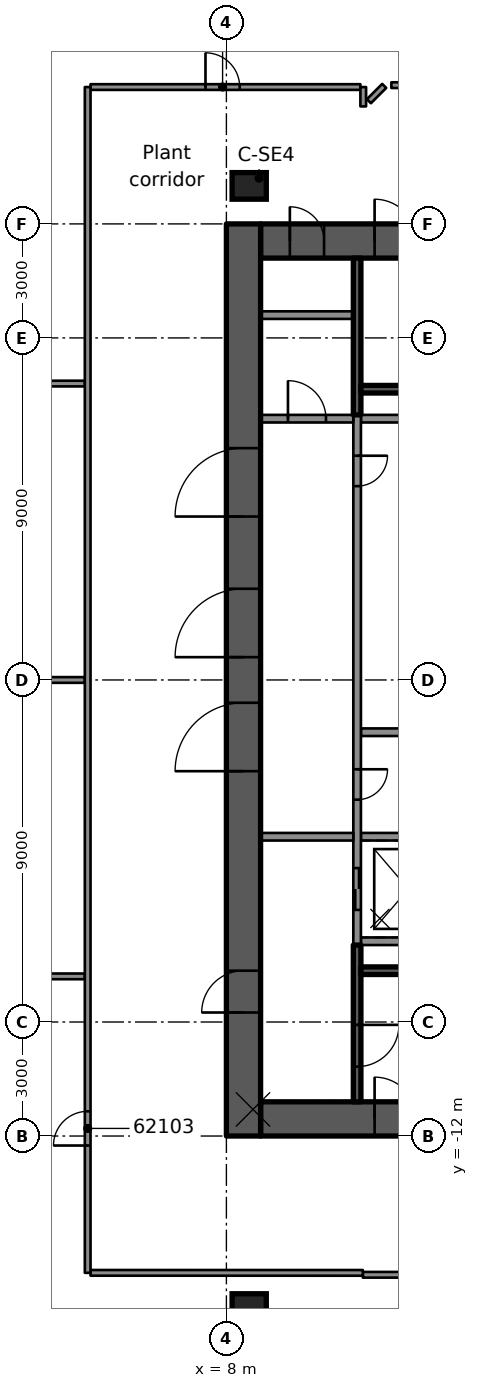
"""IFC4 building model, lengths in metres.
Left out: names, types, materials, properties, quantities, classifications, styles, units other than length and angle.
Written with IfcOpenShell. Run it as: python <this file> out.ifc"""

import sys

from ifc_helpers import new_model, si_unit, direction, frame, frame_2d, origin, origin_2d, place, context, subcontext, project, spatial, rectangle, extrude, element, fill, save


model = new_model("IFC4")
c1 = context("Model", 3, precision=1e-05, world=origin(), true_north=direction((0.0, 1.0)))
c2 = subcontext(c1, "Body", "Model", "MODEL_VIEW")
j1 = project(units=[si_unit("LENGTHUNIT", "METRE"), si_unit("PLANEANGLEUNIT", "RADIAN")], contexts=[c1])
p1 = place(None, origin())
s1 = spatial("IfcSite", under=j1, at=p1, CompositionType="ELEMENT")
p2 = place(p1, origin())
s2 = spatial("IfcBuilding", under=s1, at=p2, CompositionType="ELEMENT")
p3 = place(p2, frame((0.0, 0.0, 299.9)))
s3 = spatial("IfcBuildingStorey", under=s2, at=p3, CompositionType="ELEMENT", Elevation=299.9)
p4 = place(p3, frame((8.9, 11.55, 0.0), z_axis=(0.0, 0.0, 1.0), x_axis=(1.0, 0.0, 0.0)))
e1 = element("IfcWall", 1, at=p4, inside=s3, PredefinedType="SHEAR", context=c2, shape_type="SweptSolid", body=[
    extrude(rectangle(XDim=9.2, YDim=0.9, at=frame_2d((4.6, 0.0))), origin(), (0.0, 0.0, 1.0), 4.4),
])
p5 = place(p4, frame((3.0, 0.0, 0.0)))
e2 = element("IfcOpeningElement", 2, at=p5, cuts=e1, PredefinedType="OPENING", context=c2, shape_type="SweptSolid", body=[
    extrude(rectangle(XDim=1.1, YDim=2.1, at=frame_2d((0.55, 1.05))), frame((0.0, 0.46, 0.0), z_axis=(0.0, -1.0, 0.0), x_axis=(1.0, 0.0, 0.0)), (0.0, 0.0, 1.0), 0.92),
])
p6 = place(p4, frame((0.77, 0.0, 0.0)))
e3 = element("IfcOpeningElement", 3, at=p6, cuts=e1, PredefinedType="OPENING", context=c2, shape_type="SweptSolid", body=[
    extrude(rectangle(XDim=0.9, YDim=2.1, at=frame_2d((0.45, 1.05))), frame((0.0, 0.46, 0.0), z_axis=(0.0, -1.0, 0.0), x_axis=(1.0, 0.0, 0.0)), (0.0, 0.0, 1.0), 0.92),
])
p7 = place(p3, frame((8.9, -11.55, 0.0), z_axis=(0.0, 0.0, 1.0), x_axis=(1.0, 0.0, 0.0)))
e4 = element("IfcWall", 4, at=p7, inside=s3, PredefinedType="SHEAR", context=c2, shape_type="SweptSolid", body=[
    extrude(rectangle(XDim=9.2, YDim=0.9, at=frame_2d((4.6, 0.0))), origin(), (0.0, 0.0, 1.0), 4.4),
])
p8 = place(p7, frame((3.0, 0.0, 0.0)))
e5 = element("IfcOpeningElement", 5, at=p8, cuts=e4, PredefinedType="OPENING", context=c2, shape_type="SweptSolid", body=[
    extrude(rectangle(XDim=1.1, YDim=2.1, at=frame_2d((0.55, 1.05))), frame((0.0, 0.46, 0.0), z_axis=(0.0, -1.0, 0.0), x_axis=(1.0, 0.0, 0.0)), (0.0, 0.0, 1.0), 0.92),
])
p9 = place(p3, frame((8.45, -12.0, 0.0), z_axis=(0.0, 0.0, 1.0), x_axis=(0.0, 1.0, 0.0)))
e6 = element("IfcWall", 6, at=p9, inside=s3, PredefinedType="SHEAR", context=c2, shape_type="SweptSolid", body=[
    extrude(rectangle(XDim=24.0, YDim=0.9, at=frame_2d((12.0, 0.0))), origin(), (0.0, 0.0, 1.0), 4.4),
])
p10 = place(p9, frame((12.6, 0.0, 0.0)))
e7 = element("IfcOpeningElement", 7, at=p10, cuts=e6, PredefinedType="OPENING", context=c2, shape_type="SweptSolid", body=[
    extrude(rectangle(XDim=1.8, YDim=2.1, at=frame_2d((0.9, 1.05))), frame((0.0, 0.46, 0.0), z_axis=(0.0, -1.0, 0.0), x_axis=(1.0, 0.0, 0.0)), (0.0, 0.0, 1.0), 0.92),
])
p11 = place(p9, frame((16.3, 0.0, 0.0)))
e8 = element("IfcOpeningElement", 8, at=p11, cuts=e6, PredefinedType="OPENING", context=c2, shape_type="SweptSolid", body=[
    extrude(rectangle(XDim=1.8, YDim=2.1, at=frame_2d((0.9, 1.05))), frame((0.0, 0.46, 0.0), z_axis=(0.0, -1.0, 0.0), x_axis=(1.0, 0.0, 0.0)), (0.0, 0.0, 1.0), 0.92),
])
p12 = place(p9, frame((9.6, 0.0, 0.0)))
e9 = element("IfcOpeningElement", 9, at=p12, cuts=e6, PredefinedType="OPENING", context=c2, shape_type="SweptSolid", body=[
    extrude(rectangle(XDim=1.8, YDim=2.1, at=frame_2d((0.9, 1.05))), frame((0.0, 0.46, 0.0), z_axis=(0.0, -1.0, 0.0), x_axis=(1.0, 0.0, 0.0)), (0.0, 0.0, 1.0), 0.92),
])
p13 = place(p9, frame((3.25, 0.0, 0.0)))
e10 = element("IfcOpeningElement", 10, at=p13, cuts=e6, PredefinedType="OPENING", context=c2, shape_type="SweptSolid", body=[
    extrude(rectangle(XDim=1.1, YDim=2.1, at=frame_2d((0.55, 1.05))), frame((0.0, 0.46, 0.0), z_axis=(0.0, -1.0, 0.0), x_axis=(1.0, 0.0, 0.0)), (0.0, 0.0, 1.0), 0.92),
])
for number, where, z_axis, x_axis in (
    (11, (8.6, -16.5, 0.0), (0.0, 0.0, 1.0), (1.0, 0.0, 0.0)),
    (12, (8.6, 13.0, 0.0), (0.0, 0.0, 1.0), (1.0, 0.0, 0.0)),
):
    element("IfcColumn", number, at=place(p3, frame(where, z_axis=z_axis, x_axis=x_axis)), inside=s3, PredefinedType="COLUMN", context=c2, shape_type="SweptSolid", body=[
        extrude(rectangle(XDim=0.9, YDim=0.7, at=origin_2d()), origin(), (0.0, 0.0, 1.0), 4.4),
    ])
for number, where, z_axis, x_axis in (
    (13, (11.54, -6.875, 0.0), (0.0, 0.0, 1.0), (1.0, 0.0, 0.0)),
    (14, (11.54, 6.875, 0.0), (0.0, 0.0, 1.0), (1.0, 0.0, 0.0)),
):
    element("IfcWall", number, at=place(p3, frame(where, z_axis=z_axis, x_axis=x_axis)), inside=s3, PredefinedType="SOLIDWALL", context=c2, shape_type="SweptSolid", body=[
        extrude(rectangle(XDim=6.56, YDim=0.2, at=frame_2d((3.28, 0.0))), origin(), (0.0, 0.0, 1.0), 3.98),
    ])
p14 = place(p3, frame((11.54, -1.375, 0.0), z_axis=(0.0, 0.0, 1.0), x_axis=(1.0, 0.0, 0.0)))
e15 = element("IfcWall", 15, at=p14, inside=s3, PredefinedType="SOLIDWALL", context=c2, shape_type="SweptSolid", body=[
    extrude(rectangle(XDim=4.2, YDim=0.2, at=frame_2d((2.1, 0.0))), origin(), (0.0, 0.0, 1.0), 3.98),
])
p15 = place(p3, frame((11.54, -4.125, 0.0), z_axis=(0.0, 0.0, 1.0), x_axis=(1.0, 0.0, 0.0)))
e16 = element("IfcWall", 16, at=p15, inside=s3, PredefinedType="SOLIDWALL", context=c2, shape_type="SweptSolid", body=[
    extrude(rectangle(XDim=2.5, YDim=0.2, at=frame_2d((1.25, 0.0))), origin(), (0.0, 0.0, 1.0), 3.98),
])
p16 = place(p3, frame((11.44, 6.975, 0.0), z_axis=(0.0, 0.0, 1.0), x_axis=(0.0, -1.0, 0.0)))
e17 = element("IfcWall", 17, at=p16, inside=s3, PredefinedType="SOLIDWALL", context=c2, shape_type="SweptSolid", body=[
    extrude(rectangle(XDim=13.95, YDim=0.2, at=frame_2d((6.975, 0.0))), origin(), (0.0, 0.0, 1.0), 3.98),
])
p17 = place(p16, frame((11.925, 0.0, 0.0)))
e18 = element("IfcOpeningElement", 18, at=p17, cuts=e17, PredefinedType="OPENING", context=c2, shape_type="SweptSolid", body=[
    extrude(rectangle(XDim=1.1, YDim=2.1, at=frame_2d((0.55, 1.05))), frame((0.0, 0.11, 0.0), z_axis=(0.0, -1.0, 0.0), x_axis=(1.0, 0.0, 0.0)), (0.0, 0.0, 1.0), 0.22),
])
p18 = place(p16, frame((1.075, 0.0, 0.0)))
e19 = element("IfcOpeningElement", 19, at=p18, cuts=e17, PredefinedType="OPENING", context=c2, shape_type="SweptSolid", body=[
    extrude(rectangle(XDim=0.8, YDim=2.1, at=frame_2d((0.4, 1.05))), frame((0.0, 0.11, 0.0), z_axis=(0.0, -1.0, 0.0), x_axis=(1.0, 0.0, 0.0)), (0.0, 0.0, 1.0), 0.22),
])
p19 = place(p16, frame((9.325, 0.0, 0.0)))
e20 = element("IfcOpeningElement", 20, at=p19, cuts=e17, PredefinedType="OPENING", context=c2, shape_type="SweptSolid", body=[
    extrude(rectangle(XDim=0.8, YDim=2.1, at=frame_2d((0.4, 1.05))), frame((0.0, 0.11, 0.0), z_axis=(0.0, -1.0, 0.0), x_axis=(1.0, 0.0, 0.0)), (0.0, 0.0, 1.0), 0.22),
])
p20 = place(p3, frame((11.44, -6.975, 0.0), z_axis=(0.0, 0.0, 1.0), x_axis=(0.0, -1.0, 0.0)))
e21 = element("IfcWall", 21, at=p20, inside=s3, PredefinedType="SOLIDWALL", context=c2, shape_type="SweptSolid", body=[
    extrude(rectangle(XDim=4.125, YDim=0.2, at=frame_2d((2.062, 0.0))), origin(), (0.0, 0.0, 1.0), 3.98),
])
p21 = place(p20, frame((2.1, 0.0, 0.0)))
e22 = element("IfcOpeningElement", 22, at=p21, cuts=e21, PredefinedType="OPENING", context=c2, shape_type="SweptSolid", body=[
    extrude(rectangle(XDim=1.1, YDim=2.1, at=frame_2d((0.55, 1.05))), frame((0.0, 0.11, 0.0), z_axis=(0.0, -1.0, 0.0), x_axis=(1.0, 0.0, 0.0)), (0.0, 0.0, 1.0), 0.22),
])
p22 = place(p3, frame((11.54, -7.65, 0.0), z_axis=(0.0, 0.0, 1.0), x_axis=(1.0, 0.0, 0.0)))
e23 = element("IfcWall", 23, at=p22, inside=s3, PredefinedType="SOLIDWALL", context=c2, shape_type="SweptSolid", body=[
    extrude(rectangle(XDim=6.56, YDim=0.2, at=frame_2d((3.28, 0.0))), origin(), (0.0, 0.0, 1.0), 3.98),
])
p23 = place(p3, frame((11.44, 11.1, 0.0), z_axis=(0.0, 0.0, 1.0), x_axis=(0.0, -1.0, 0.0)))
e24 = element("IfcWall", 24, at=p23, inside=s3, PredefinedType="SOLIDWALL", context=c2, shape_type="SweptSolid", body=[
    extrude(rectangle(XDim=4.125, YDim=0.2, at=frame_2d((2.062, 0.0))), origin(), (0.0, 0.0, 1.0), 3.98),
])
p24 = place(p3, frame((11.54, 7.65, 0.0), z_axis=(0.0, 0.0, 1.0), x_axis=(1.0, 0.0, 0.0)))
e25 = element("IfcWall", 25, at=p24, inside=s3, PredefinedType="SOLIDWALL", context=c2, shape_type="SweptSolid", body=[
    extrude(rectangle(XDim=6.56, YDim=0.2, at=frame_2d((3.28, 0.0))), origin(), (0.0, 0.0, 1.0), 3.98),
])
p25 = place(p3, frame((8.9, -4.125, 0.0), z_axis=(0.0, 0.0, 1.0), x_axis=(1.0, 0.0, 0.0)))
e26 = element("IfcWall", 26, at=p25, inside=s3, PredefinedType="PARTITIONING", context=c2, shape_type="SweptSolid", body=[
    extrude(rectangle(XDim=2.44, YDim=0.2, at=frame_2d((1.22, 0.0))), origin(), (0.0, 0.0, 1.0), 3.98),
])
p26 = place(p3, frame((8.9, 6.875, 0.0), z_axis=(0.0, 0.0, 1.0), x_axis=(1.0, 0.0, 0.0)))
e27 = element("IfcWall", 27, at=p26, inside=s3, PredefinedType="PARTITIONING", context=c2, shape_type="SweptSolid", body=[
    extrude(rectangle(XDim=2.44, YDim=0.2, at=frame_2d((1.22, 0.0))), origin(), (0.0, 0.0, 1.0), 3.98),
])
p27 = place(p26, frame((0.72, 0.0, 0.0)))
e28 = element("IfcOpeningElement", 28, at=p27, cuts=e27, PredefinedType="OPENING", context=c2, shape_type="SweptSolid", body=[
    extrude(rectangle(XDim=1.0, YDim=2.1, at=frame_2d((0.5, 1.05))), frame((0.0, 0.11, 0.0), z_axis=(0.0, -1.0, 0.0), x_axis=(1.0, 0.0, 0.0)), (0.0, 0.0, 1.0), 0.22),
])
p28 = place(p3, frame((8.9, 9.6, 0.0), z_axis=(0.0, 0.0, 1.0), x_axis=(1.0, 0.0, 0.0)))
e29 = element("IfcWall", 29, at=p28, inside=s3, PredefinedType="PARTITIONING", context=c2, shape_type="SweptSolid", body=[
    extrude(rectangle(XDim=2.44, YDim=0.2, at=frame_2d((1.22, 0.0))), origin(), (0.0, 0.0, 1.0), 3.98),
])
p29 = place(p3, frame((11.591, -15.651, 0.0), z_axis=(0.0, 0.0, 1.0), x_axis=(1.0, 0.0, 0.0)))
e30 = element("IfcWall", 30, at=p29, inside=s3, PredefinedType="PARTITIONING", context=c2, shape_type="SweptSolid", body=[
    extrude(rectangle(XDim=10.984, YDim=0.15, at=frame_2d((5.492, 0.0))), origin(), (0.0, 0.0, 1.0), 3.98),
])
p30 = place(p3, frame((4.425, -15.6, 0.0), z_axis=(0.0, 0.0, 1.0), x_axis=(0.999999990712, -0.000136295487, 0.0)))
e31 = element("IfcWall", 31, at=p30, inside=s3, PredefinedType="PARTITIONING", context=c2, shape_type="SweptSolid", body=[
    extrude(rectangle(XDim=7.165, YDim=0.15, at=frame_2d((3.583, 0.0))), origin(), (0.0, 0.0, 1.0), 3.98),
])
for number, where, z_axis, x_axis in (
    (32, (-4.274, -7.799, 0.0), (0.0, 0.0, 1.0), (1.0, 0.0, 0.0)),
    (33, (-4.274, 0.0, 0.0), (0.0, 0.0, 1.0), (1.0, 0.0, 0.0)),
    (34, (-4.274, 7.799, 0.0), (0.0, 0.0, 1.0), (1.0, 0.0, 0.0)),
):
    element("IfcWall", number, at=place(p3, frame(where, z_axis=z_axis, x_axis=x_axis)), inside=s3, PredefinedType="PARTITIONING", context=c2, shape_type="SweptSolid", body=[
        extrude(rectangle(XDim=8.549, YDim=0.15, at=frame_2d((4.274, 0.0))), origin(), (0.0, 0.0, 1.0), 3.98),
    ])
p31 = place(p3, frame((4.425, 15.601, 0.0), z_axis=(0.0, 0.0, 1.0), x_axis=(1.0, 0.0, 0.0)))
e35 = element("IfcWall", 35, at=p31, inside=s3, PredefinedType="PARTITIONING", context=c2, shape_type="SweptSolid", body=[
    extrude(rectangle(XDim=7.1, YDim=0.15, at=frame_2d((3.55, 0.0))), origin(), (0.0, 0.0, 1.0), 3.98),
])
p32 = place(p31, frame((3.025, 0.0, 0.0)))
e36 = element("IfcOpeningElement", 36, at=p32, cuts=e35, PredefinedType="OPENING", context=c2, shape_type="SweptSolid", body=[
    extrude(rectangle(XDim=0.9, YDim=2.1, at=frame_2d((0.45, 1.05))), frame((0.0, 0.085, 0.0), z_axis=(0.0, -1.0, 0.0), x_axis=(1.0, 0.0, 0.0)), (0.0, 0.0, 1.0), 0.17),
])
p33 = place(p3, frame((12.341, 15.651, 0.0), z_axis=(0.0, 0.0, 1.0), x_axis=(1.0, 0.0, 0.0)))
e37 = element("IfcWall", 37, at=p33, inside=s3, PredefinedType="PARTITIONING", context=c2, shape_type="SweptSolid", body=[
    extrude(rectangle(XDim=10.234, YDim=0.15, at=frame_2d((5.117, 0.0))), origin(), (0.0, 0.0, 1.0), 3.98),
])
p34 = place(p3, frame((11.75, 15.228, 0.0), z_axis=(0.0, 0.0, 1.0), x_axis=(0.707106781187, 0.707106781187, 0.0)))
e38 = element("IfcWall", 38, at=p34, inside=s3, PredefinedType="PARTITIONING", context=c2, shape_type="SweptSolid", body=[
    extrude(rectangle(XDim=0.57, YDim=0.15, at=frame_2d((0.285, 0.0))), origin(), (0.0, 0.0, 1.0), 3.98),
])
p35 = place(p3, frame((11.601, 15.092, 0.0), z_axis=(0.0, 0.0, 1.0), x_axis=(0.0, 1.0, 0.0)))
e39 = element("IfcWall", 39, at=p35, inside=s3, PredefinedType="PARTITIONING", context=c2, shape_type="SweptSolid", body=[
    extrude(rectangle(XDim=0.508, YDim=0.15, at=frame_2d((0.254, 0.0))), origin(), (0.0, 0.0, 1.0), 3.98),
])
p36 = place(p3, frame((4.35, -15.6, 0.0), z_axis=(0.0, 0.0, 1.0), x_axis=(0.0, 1.0, 0.0)))
e40 = element("IfcWall", 40, at=p36, inside=s3, PredefinedType="PARTITIONING", context=c2, shape_type="SweptSolid", body=[
    extrude(rectangle(XDim=31.201, YDim=0.15, at=frame_2d((15.601, 0.0))), origin(), (0.0, 0.0, 1.0), 3.98),
])
p37 = place(p36, frame((3.35, 0.0, 0.0)))
e41 = element("IfcOpeningElement", 41, at=p37, cuts=e40, PredefinedType="OPENING", context=c2, shape_type="SweptSolid", body=[
    extrude(rectangle(XDim=0.9, YDim=2.1, at=frame_2d((0.45, 1.05))), frame((0.0, 0.085, 0.0), z_axis=(0.0, -1.0, 0.0), x_axis=(1.0, 0.0, 0.0)), (0.0, 0.0, 1.0), 0.17),
])
p38 = place(p17, origin())
e42 = element("IfcDoor", 42, at=p38, inside=s3, OperationType="DOUBLE_DOOR_SLIDING", PredefinedType="DOOR", context=c2, shape_type="SweptSolid", body=[
    extrude(rectangle(XDim=1.1, YDim=2.1, at=frame_2d((0.55, 1.05))), frame((0.0, 0.025, 0.0), z_axis=(0.0, -1.0, 0.0), x_axis=(1.0, 0.0, 0.0)), (0.0, 0.0, 1.0), 0.05),
])
fill(e18, e42)
p39 = place(p18, origin())
e43 = element("IfcDoor", 43, at=p39, inside=s3, OperationType="SINGLE_SWING_LEFT", PredefinedType="DOOR", context=c2, shape_type="SweptSolid", body=[
    extrude(rectangle(XDim=0.8, YDim=2.1, at=frame_2d((0.4, 1.05))), frame((0.0, 0.025, 0.0), z_axis=(0.0, -1.0, 0.0), x_axis=(1.0, 0.0, 0.0)), (0.0, 0.0, 1.0), 0.05),
])
fill(e19, e43)
p40 = place(p19, origin())
e44 = element("IfcDoor", 44, at=p40, inside=s3, OperationType="SINGLE_SWING_LEFT", PredefinedType="DOOR", context=c2, shape_type="SweptSolid", body=[
    extrude(rectangle(XDim=0.8, YDim=2.1, at=frame_2d((0.4, 1.05))), frame((0.0, 0.025, 0.0), z_axis=(0.0, -1.0, 0.0), x_axis=(1.0, 0.0, 0.0)), (0.0, 0.0, 1.0), 0.05),
])
fill(e20, e44)
p41 = place(p10, origin())
e45 = element("IfcDoor", 45, at=p41, inside=s3, OperationType="SINGLE_SWING_RIGHT", PredefinedType="DOOR", context=c2, shape_type="SweptSolid", body=[
    extrude(rectangle(XDim=1.8, YDim=2.1, at=frame_2d((0.9, 1.05))), frame((0.0, 0.025, 0.0), z_axis=(0.0, -1.0, 0.0), x_axis=(1.0, 0.0, 0.0)), (0.0, 0.0, 1.0), 0.05),
])
fill(e7, e45)
p42 = place(p11, origin())
e46 = element("IfcDoor", 46, at=p42, inside=s3, OperationType="SINGLE_SWING_RIGHT", PredefinedType="DOOR", context=c2, shape_type="SweptSolid", body=[
    extrude(rectangle(XDim=1.8, YDim=2.1, at=frame_2d((0.9, 1.05))), frame((0.0, 0.025, 0.0), z_axis=(0.0, -1.0, 0.0), x_axis=(1.0, 0.0, 0.0)), (0.0, 0.0, 1.0), 0.05),
])
fill(e8, e46)
p43 = place(p12, origin())
e47 = element("IfcDoor", 47, at=p43, inside=s3, OperationType="SINGLE_SWING_LEFT", PredefinedType="DOOR", context=c2, shape_type="SweptSolid", body=[
    extrude(rectangle(XDim=1.8, YDim=2.1, at=frame_2d((0.9, 1.05))), frame((0.0, 0.025, 0.0), z_axis=(0.0, -1.0, 0.0), x_axis=(1.0, 0.0, 0.0)), (0.0, 0.0, 1.0), 0.05),
])
fill(e9, e47)
p44 = place(p13, origin())
e48 = element("IfcDoor", 48, at=p44, inside=s3, OperationType="SINGLE_SWING_LEFT", PredefinedType="DOOR", context=c2, shape_type="SweptSolid", body=[
    extrude(rectangle(XDim=1.1, YDim=2.1, at=frame_2d((0.55, 1.05))), frame((0.0, 0.025, 0.0), z_axis=(0.0, -1.0, 0.0), x_axis=(1.0, 0.0, 0.0)), (0.0, 0.0, 1.0), 0.05),
])
fill(e10, e48)
p45 = place(p8, origin())
e49 = element("IfcDoor", 49, at=p45, inside=s3, OperationType="SINGLE_SWING_LEFT", PredefinedType="DOOR", context=c2, shape_type="SweptSolid", body=[
    extrude(rectangle(XDim=1.1, YDim=2.1, at=frame_2d((0.55, 1.05))), frame((0.0, 0.025, 0.0), z_axis=(0.0, -1.0, 0.0), x_axis=(1.0, 0.0, 0.0)), (0.0, 0.0, 1.0), 0.05),
])
fill(e5, e49)
p46 = place(p5, origin())
e50 = element("IfcDoor", 50, at=p46, inside=s3, OperationType="SINGLE_SWING_LEFT", PredefinedType="DOOR", context=c2, shape_type="SweptSolid", body=[
    extrude(rectangle(XDim=1.1, YDim=2.1, at=frame_2d((0.55, 1.05))), frame((0.0, 0.025, 0.0), z_axis=(0.0, -1.0, 0.0), x_axis=(1.0, 0.0, 0.0)), (0.0, 0.0, 1.0), 0.05),
])
fill(e2, e50)
p47 = place(p21, origin())
e51 = element("IfcDoor", 51, at=p47, inside=s3, OperationType="SINGLE_SWING_RIGHT", PredefinedType="DOOR", context=c2, shape_type="SweptSolid", body=[
    extrude(rectangle(XDim=1.1, YDim=2.1, at=frame_2d((0.55, 1.05))), frame((0.0, 0.025, 0.0), z_axis=(0.0, -1.0, 0.0), x_axis=(1.0, 0.0, 0.0)), (0.0, 0.0, 1.0), 0.05),
])
fill(e22, e51)
p48 = place(p6, origin())
e52 = element("IfcDoor", 52, at=p48, inside=s3, OperationType="SINGLE_SWING_LEFT", PredefinedType="DOOR", context=c2, shape_type="SweptSolid", body=[
    extrude(rectangle(XDim=0.9, YDim=2.1, at=frame_2d((0.45, 1.05))), frame((0.0, 0.025, 0.0), z_axis=(0.0, -1.0, 0.0), x_axis=(1.0, 0.0, 0.0)), (0.0, 0.0, 1.0), 0.05),
])
fill(e3, e52)
p49 = place(p27, origin())
e53 = element("IfcDoor", 53, at=p49, inside=s3, OperationType="SINGLE_SWING_RIGHT", PredefinedType="DOOR", context=c2, shape_type="SweptSolid", body=[
    extrude(rectangle(XDim=1.0, YDim=2.1, at=frame_2d((0.5, 1.05))), frame((0.0, 0.025, 0.0), z_axis=(0.0, -1.0, 0.0), x_axis=(1.0, 0.0, 0.0)), (0.0, 0.0, 1.0), 0.05),
])
fill(e28, e53)
p50 = place(p37, origin())
e54 = element("IfcDoor", 54, at=p50, inside=s3, OperationType="SINGLE_SWING_LEFT", PredefinedType="DOOR", context=c2, shape_type="SweptSolid", body=[
    extrude(rectangle(XDim=0.9, YDim=2.1, at=frame_2d((0.45, 1.05))), frame((0.0, 0.025, 0.0), z_axis=(0.0, -1.0, 0.0), x_axis=(1.0, 0.0, 0.0)), (0.0, 0.0, 1.0), 0.05),
])
fill(e41, e54)
p51 = place(p32, origin())
e55 = element("IfcDoor", 55, at=p51, inside=s3, OperationType="SINGLE_SWING_LEFT", PredefinedType="DOOR", context=c2, shape_type="SweptSolid", body=[
    extrude(rectangle(XDim=0.9, YDim=2.1, at=frame_2d((0.45, 1.05))), frame((0.0, 0.025, 0.0), z_axis=(0.0, -1.0, 0.0), x_axis=(1.0, 0.0, 0.0)), (0.0, 0.0, 1.0), 0.05),
])
fill(e36, e55)
save(model, sys.argv[1])
